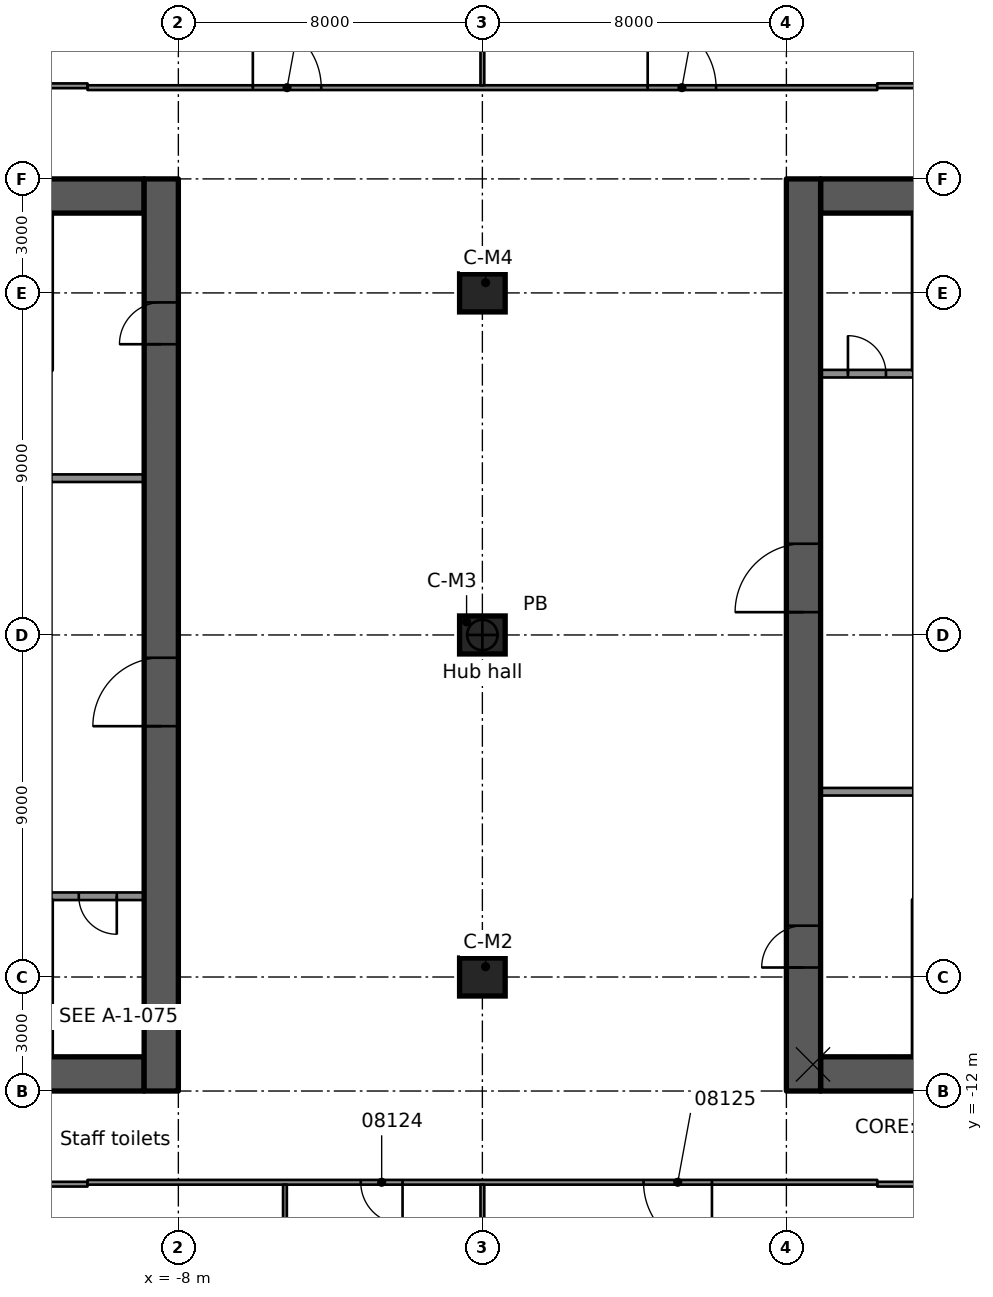
"""IFC4 building model, lengths in metres.
Left out: names, types, materials, properties, quantities, classifications, styles, units other than length and angle.
Written with IfcOpenShell. Run it as: python <this file> out.ifc"""

import sys

from ifc_helpers import new_model, si_unit, direction, frame, frame_2d, origin, origin_2d, place, context, subcontext, project, spatial, rectangle, extrude, element, fill, save


model = new_model("IFC4")
c1 = context("Model", 3, precision=1e-05, world=origin(), true_north=direction((0.0, 1.0)))
c2 = subcontext(c1, "Body", "Model", "MODEL_VIEW")
j1 = project(units=[si_unit("LENGTHUNIT", "METRE"), si_unit("PLANEANGLEUNIT", "RADIAN")], contexts=[c1])
p1 = place(None, origin())
s1 = spatial("IfcSite", under=j1, at=p1, CompositionType="ELEMENT")
p2 = place(p1, origin())
s2 = spatial("IfcBuilding", under=s1, at=p2, CompositionType="ELEMENT")
p3 = place(p2, frame((0.0, 0.0, 37.3)))
s3 = spatial("IfcBuildingStorey", under=s2, at=p3, CompositionType="ELEMENT", Elevation=37.3)
p4 = place(p3, frame((-18.1, 11.55, 0.0), z_axis=(0.0, 0.0, 1.0), x_axis=(1.0, 0.0, 0.0)))
e1 = element("IfcWall", 1, at=p4, inside=s3, PredefinedType="SHEAR", context=c2, shape_type="SweptSolid", body=[
    extrude(rectangle(XDim=9.2, YDim=0.9, at=frame_2d((4.6, 0.0))), origin(), (0.0, 0.0, 1.0), 3.5),
])
p5 = place(p4, frame((5.1, 0.0, 0.0)))
e2 = element("IfcOpeningElement", 2, at=p5, cuts=e1, PredefinedType="OPENING", context=c2, shape_type="SweptSolid", body=[
    extrude(rectangle(XDim=1.1, YDim=2.1, at=frame_2d((0.55, 1.05))), frame((0.0, 0.46, 0.0), z_axis=(0.0, -1.0, 0.0), x_axis=(1.0, 0.0, 0.0)), (0.0, 0.0, 1.0), 0.92),
])
p6 = place(p3, frame((-18.1, -11.55, 0.0), z_axis=(0.0, 0.0, 1.0), x_axis=(1.0, 0.0, 0.0)))
e3 = element("IfcWall", 3, at=p6, inside=s3, PredefinedType="SHEAR", context=c2, shape_type="SweptSolid", body=[
    extrude(rectangle(XDim=9.2, YDim=0.9, at=frame_2d((4.6, 0.0))), origin(), (0.0, 0.0, 1.0), 3.5),
])
p7 = place(p6, frame((5.1, 0.0, 0.0)))
e4 = element("IfcOpeningElement", 4, at=p7, cuts=e3, PredefinedType="OPENING", context=c2, shape_type="SweptSolid", body=[
    extrude(rectangle(XDim=1.1, YDim=2.1, at=frame_2d((0.55, 1.05))), frame((0.0, 0.46, 0.0), z_axis=(0.0, -1.0, 0.0), x_axis=(1.0, 0.0, 0.0)), (0.0, 0.0, 1.0), 0.92),
])
p8 = place(p3, frame((-8.45, -12.0, 0.0), z_axis=(0.0, 0.0, 1.0), x_axis=(0.0, 1.0, 0.0)))
e5 = element("IfcWall", 5, at=p8, inside=s3, PredefinedType="SHEAR", context=c2, shape_type="SweptSolid", body=[
    extrude(rectangle(XDim=24.0, YDim=0.9, at=frame_2d((12.0, 0.0))), origin(), (0.0, 0.0, 1.0), 3.5),
])
p9 = place(p8, frame((9.6, 0.0, 0.0)))
e6 = element("IfcOpeningElement", 6, at=p9, cuts=e5, PredefinedType="OPENING", context=c2, shape_type="SweptSolid", body=[
    extrude(rectangle(XDim=1.8, YDim=2.1, at=frame_2d((0.9, 1.05))), frame((0.0, 0.46, 0.0), z_axis=(0.0, -1.0, 0.0), x_axis=(1.0, 0.0, 0.0)), (0.0, 0.0, 1.0), 0.92),
])
p10 = place(p8, frame((19.65, 0.0, 0.0)))
e7 = element("IfcOpeningElement", 7, at=p10, cuts=e5, PredefinedType="OPENING", context=c2, shape_type="SweptSolid", body=[
    extrude(rectangle(XDim=1.1, YDim=2.1, at=frame_2d((0.55, 1.05))), frame((0.0, 0.46, 0.0), z_axis=(0.0, -1.0, 0.0), x_axis=(1.0, 0.0, 0.0)), (0.0, 0.0, 1.0), 0.92),
])
p11 = place(p3, frame((8.9, 11.55, 0.0), z_axis=(0.0, 0.0, 1.0), x_axis=(1.0, 0.0, 0.0)))
e8 = element("IfcWall", 8, at=p11, inside=s3, PredefinedType="SHEAR", context=c2, shape_type="SweptSolid", body=[
    extrude(rectangle(XDim=9.2, YDim=0.9, at=frame_2d((4.6, 0.0))), origin(), (0.0, 0.0, 1.0), 3.5),
])
p12 = place(p11, frame((3.0, 0.0, 0.0)))
e9 = element("IfcOpeningElement", 9, at=p12, cuts=e8, PredefinedType="OPENING", context=c2, shape_type="SweptSolid", body=[
    extrude(rectangle(XDim=1.1, YDim=2.1, at=frame_2d((0.55, 1.05))), frame((0.0, 0.46, 0.0), z_axis=(0.0, -1.0, 0.0), x_axis=(1.0, 0.0, 0.0)), (0.0, 0.0, 1.0), 0.92),
])
p13 = place(p3, frame((8.9, -11.55, 0.0), z_axis=(0.0, 0.0, 1.0), x_axis=(1.0, 0.0, 0.0)))
e10 = element("IfcWall", 10, at=p13, inside=s3, PredefinedType="SHEAR", context=c2, shape_type="SweptSolid", body=[
    extrude(rectangle(XDim=9.2, YDim=0.9, at=frame_2d((4.6, 0.0))), origin(), (0.0, 0.0, 1.0), 3.5),
])
p14 = place(p13, frame((3.0, 0.0, 0.0)))
e11 = element("IfcOpeningElement", 11, at=p14, cuts=e10, PredefinedType="OPENING", context=c2, shape_type="SweptSolid", body=[
    extrude(rectangle(XDim=1.1, YDim=2.1, at=frame_2d((0.55, 1.05))), frame((0.0, 0.46, 0.0), z_axis=(0.0, -1.0, 0.0), x_axis=(1.0, 0.0, 0.0)), (0.0, 0.0, 1.0), 0.92),
])
p15 = place(p3, frame((8.45, -12.0, 0.0), z_axis=(0.0, 0.0, 1.0), x_axis=(0.0, 1.0, 0.0)))
e12 = element("IfcWall", 12, at=p15, inside=s3, PredefinedType="SHEAR", context=c2, shape_type="SweptSolid", body=[
    extrude(rectangle(XDim=24.0, YDim=0.9, at=frame_2d((12.0, 0.0))), origin(), (0.0, 0.0, 1.0), 3.5),
])
p16 = place(p15, frame((12.6, 0.0, 0.0)))
e13 = element("IfcOpeningElement", 13, at=p16, cuts=e12, PredefinedType="OPENING", context=c2, shape_type="SweptSolid", body=[
    extrude(rectangle(XDim=1.8, YDim=2.1, at=frame_2d((0.9, 1.05))), frame((0.0, 0.46, 0.0), z_axis=(0.0, -1.0, 0.0), x_axis=(1.0, 0.0, 0.0)), (0.0, 0.0, 1.0), 0.92),
])
p17 = place(p15, frame((3.25, 0.0, 0.0)))
e14 = element("IfcOpeningElement", 14, at=p17, cuts=e12, PredefinedType="OPENING", context=c2, shape_type="SweptSolid", body=[
    extrude(rectangle(XDim=1.1, YDim=2.1, at=frame_2d((0.55, 1.05))), frame((0.0, 0.46, 0.0), z_axis=(0.0, -1.0, 0.0), x_axis=(1.0, 0.0, 0.0)), (0.0, 0.0, 1.0), 0.92),
])
for number, where, z_axis, x_axis in (
    (15, (0.0, -9.0, 0.0), (0.0, 0.0, 1.0), (1.0, 0.0, 0.0)),
    (16, (0.0, 0.0, 0.0), (0.0, 0.0, 1.0), (1.0, 0.0, 0.0)),
    (17, (0.0, 9.0, 0.0), (0.0, 0.0, 1.0), (1.0, 0.0, 0.0)),
):
    element("IfcColumn", number, at=place(p3, frame(where, z_axis=z_axis, x_axis=x_axis)), inside=s3, PredefinedType="COLUMN", context=c2, shape_type="SweptSolid", body=[
        extrude(rectangle(XDim=1.2, YDim=1.0, at=origin_2d()), origin(), (0.0, 0.0, 1.0), 3.5),
    ])
p18 = place(p3, frame((-8.9, 4.125, 0.0), z_axis=(0.0, 0.0, 1.0), x_axis=(-1.0, 0.0, 0.0)))
e18 = element("IfcWall", 18, at=p18, inside=s3, PredefinedType="PARTITIONING", context=c2, shape_type="SweptSolid", body=[
    extrude(rectangle(XDim=2.44, YDim=0.2, at=frame_2d((1.22, 0.0))), origin(), (0.0, 0.0, 1.0), 3.08),
])
p19 = place(p3, frame((-8.9, -6.875, 0.0), z_axis=(0.0, 0.0, 1.0), x_axis=(-1.0, 0.0, 0.0)))
e19 = element("IfcWall", 19, at=p19, inside=s3, PredefinedType="PARTITIONING", context=c2, shape_type="SweptSolid", body=[
    extrude(rectangle(XDim=2.44, YDim=0.2, at=frame_2d((1.22, 0.0))), origin(), (0.0, 0.0, 1.0), 3.08),
])
p20 = place(p19, frame((0.72, 0.0, 0.0)))
e20 = element("IfcOpeningElement", 20, at=p20, cuts=e19, PredefinedType="OPENING", context=c2, shape_type="SweptSolid", body=[
    extrude(rectangle(XDim=1.0, YDim=2.1, at=frame_2d((0.5, 1.05))), frame((0.0, 0.11, 0.0), z_axis=(0.0, -1.0, 0.0), x_axis=(1.0, 0.0, 0.0)), (0.0, 0.0, 1.0), 0.22),
])
p21 = place(p3, frame((8.9, -4.125, 0.0), z_axis=(0.0, 0.0, 1.0), x_axis=(1.0, 0.0, 0.0)))
e21 = element("IfcWall", 21, at=p21, inside=s3, PredefinedType="PARTITIONING", context=c2, shape_type="SweptSolid", body=[
    extrude(rectangle(XDim=2.44, YDim=0.2, at=frame_2d((1.22, 0.0))), origin(), (0.0, 0.0, 1.0), 3.08),
])
p22 = place(p3, frame((8.9, 6.875, 0.0), z_axis=(0.0, 0.0, 1.0), x_axis=(1.0, 0.0, 0.0)))
e22 = element("IfcWall", 22, at=p22, inside=s3, PredefinedType="PARTITIONING", context=c2, shape_type="SweptSolid", body=[
    extrude(rectangle(XDim=2.44, YDim=0.2, at=frame_2d((1.22, 0.0))), origin(), (0.0, 0.0, 1.0), 3.08),
])
p23 = place(p22, frame((0.72, 0.0, 0.0)))
e23 = element("IfcOpeningElement", 23, at=p23, cuts=e22, PredefinedType="OPENING", context=c2, shape_type="SweptSolid", body=[
    extrude(rectangle(XDim=1.0, YDim=2.1, at=frame_2d((0.5, 1.05))), frame((0.0, 0.11, 0.0), z_axis=(0.0, -1.0, 0.0), x_axis=(1.0, 0.0, 0.0)), (0.0, 0.0, 1.0), 0.22),
])
p24 = place(p3, frame((-14.736, -14.451, 0.0), z_axis=(0.0, 0.0, 1.0), x_axis=(1.0, 0.0, 0.0)))
e24 = element("IfcWall", 24, at=p24, inside=s3, PredefinedType="PARTITIONING", context=c2, shape_type="SweptSolid", body=[
    extrude(rectangle(XDim=4.345, YDim=0.125, at=frame_2d((2.172, 0.0))), origin(), (0.0, 0.0, 1.0), 3.06),
])
p25 = place(p3, frame((10.391, -14.451, 0.0), z_axis=(0.0, 0.0, 1.0), x_axis=(1.0, 0.0, 0.0)))
e25 = element("IfcWall", 25, at=p25, inside=s3, PredefinedType="PARTITIONING", context=c2, shape_type="SweptSolid", body=[
    extrude(rectangle(XDim=6.458, YDim=0.125, at=frame_2d((3.229, 0.0))), origin(), (0.0, 0.0, 1.0), 3.06),
])
p26 = place(p3, frame((10.391, -14.401, 0.0), z_axis=(0.0, 0.0, 1.0), x_axis=(-1.0, 0.0, 0.0)))
e26 = element("IfcWall", 26, at=p26, inside=s3, PredefinedType="PARTITIONING", context=c2, shape_type="SweptSolid", body=[
    extrude(rectangle(XDim=20.781, YDim=0.125, at=frame_2d((10.391, 0.0))), origin(), (0.0, 0.0, 1.0), 3.06),
])
p27 = place(p26, frame((12.491, 0.0, 0.0)))
e27 = element("IfcOpeningElement", 27, at=p27, cuts=e26, PredefinedType="OPENING", context=c2, shape_type="SweptSolid", body=[
    extrude(rectangle(XDim=1.1, YDim=2.1, at=frame_2d((0.55, 1.05))), frame((0.0, 0.073, 0.0), z_axis=(0.0, -1.0, 0.0), x_axis=(1.0, 0.0, 0.0)), (0.0, 0.0, 1.0), 0.145),
])
p28 = place(p26, frame((4.35, 0.0, 0.0)))
e28 = element("IfcOpeningElement", 28, at=p28, cuts=e26, PredefinedType="OPENING", context=c2, shape_type="SweptSolid", body=[
    extrude(rectangle(XDim=1.8, YDim=2.1, at=frame_2d((0.9, 1.05))), frame((0.0, 0.073, 0.0), z_axis=(0.0, -1.0, 0.0), x_axis=(1.0, 0.0, 0.0)), (0.0, 0.0, 1.0), 0.145),
])
p29 = place(p3, frame((-10.39, 14.401, 0.0), z_axis=(0.0, 0.0, 1.0), x_axis=(1.0, 0.0, 0.0)))
e29 = element("IfcWall", 29, at=p29, inside=s3, PredefinedType="PARTITIONING", context=c2, shape_type="SweptSolid", body=[
    extrude(rectangle(XDim=20.781, YDim=0.125, at=frame_2d((10.391, 0.0))), origin(), (0.0, 0.0, 1.0), 3.06),
])
p30 = place(p29, frame((14.74, 0.0, 0.0)))
e30 = element("IfcOpeningElement", 30, at=p30, cuts=e29, PredefinedType="OPENING", context=c2, shape_type="SweptSolid", body=[
    extrude(rectangle(XDim=1.8, YDim=2.1, at=frame_2d((0.9, 1.05))), frame((0.0, 0.073, 0.0), z_axis=(0.0, -1.0, 0.0), x_axis=(1.0, 0.0, 0.0)), (0.0, 0.0, 1.0), 0.145),
])
p31 = place(p29, frame((4.35, 0.0, 0.0)))
e31 = element("IfcOpeningElement", 31, at=p31, cuts=e29, PredefinedType="OPENING", context=c2, shape_type="SweptSolid", body=[
    extrude(rectangle(XDim=1.8, YDim=2.1, at=frame_2d((0.9, 1.05))), frame((0.0, 0.073, 0.0), z_axis=(0.0, -1.0, 0.0), x_axis=(1.0, 0.0, 0.0)), (0.0, 0.0, 1.0), 0.145),
])
p32 = place(p3, frame((-24.731, 14.45, 0.0), z_axis=(0.0, 0.0, 1.0), x_axis=(1.0, 0.0, 0.0)))
e32 = element("IfcWall", 32, at=p32, inside=s3, PredefinedType="PARTITIONING", context=c2, shape_type="SweptSolid", body=[
    extrude(rectangle(XDim=14.34, YDim=0.125, at=frame_2d((7.17, 0.0))), origin(), (0.0, 0.0, 1.0), 3.06),
])
p33 = place(p32, frame((6.131, 0.0, 0.0)))
e33 = element("IfcOpeningElement", 33, at=p33, cuts=e32, PredefinedType="OPENING", context=c2, shape_type="SweptSolid", body=[
    extrude(rectangle(XDim=1.8, YDim=2.1, at=frame_2d((0.9, 1.05))), frame((0.0, 0.073, 0.0), z_axis=(0.0, -1.0, 0.0), x_axis=(1.0, 0.0, 0.0)), (0.0, 0.0, 1.0), 0.145),
])
p34 = place(p3, frame((10.391, 14.451, 0.0), z_axis=(0.0, 0.0, 1.0), x_axis=(1.0, 0.0, 0.0)))
e34 = element("IfcWall", 34, at=p34, inside=s3, PredefinedType="PARTITIONING", context=c2, shape_type="SweptSolid", body=[
    extrude(rectangle(XDim=10.996, YDim=0.125, at=frame_2d((5.498, 0.0))), origin(), (0.0, 0.0, 1.0), 3.06),
])
for number, where, z_axis, x_axis in (
    (35, (0.0, -30.398, 0.0), (0.0, 0.0, 1.0), (0.0, 1.0, 0.0)),
    (36, (0.0, 14.463, 0.0), (0.0, 0.0, 1.0), (0.0, 1.0, 0.0)),
):
    element("IfcWall", number, at=place(p3, frame(where, z_axis=z_axis, x_axis=x_axis)), inside=s3, PredefinedType="PARTITIONING", context=c2, shape_type="SweptSolid", body=[
        extrude(rectangle(XDim=15.935, YDim=0.1, at=frame_2d((7.968, 0.0))), origin(), (0.0, 0.0, 1.0), 3.06),
    ])
p35 = place(p3, frame((-5.195, -32.637, 0.0), z_axis=(0.0, 0.0, 1.0), x_axis=(0.0, 1.0, 0.0)))
e37 = element("IfcWall", 37, at=p35, inside=s3, PredefinedType="PARTITIONING", context=c2, shape_type="SweptSolid", body=[
    extrude(rectangle(XDim=18.174, YDim=0.1, at=frame_2d((9.087, 0.0))), origin(), (0.0, 0.0, 1.0), 3.06),
])
p36 = place(p9, origin())
e38 = element("IfcDoor", 38, at=p36, inside=s3, OperationType="SINGLE_SWING_LEFT", PredefinedType="DOOR", context=c2, shape_type="SweptSolid", body=[
    extrude(rectangle(XDim=1.8, YDim=2.1, at=frame_2d((0.9, 1.05))), frame((0.0, 0.025, 0.0), z_axis=(0.0, -1.0, 0.0), x_axis=(1.0, 0.0, 0.0)), (0.0, 0.0, 1.0), 0.05),
])
fill(e6, e38)
p37 = place(p10, origin())
e39 = element("IfcDoor", 39, at=p37, inside=s3, OperationType="SINGLE_SWING_RIGHT", PredefinedType="DOOR", context=c2, shape_type="SweptSolid", body=[
    extrude(rectangle(XDim=1.1, YDim=2.1, at=frame_2d((0.55, 1.05))), frame((0.0, 0.025, 0.0), z_axis=(0.0, -1.0, 0.0), x_axis=(1.0, 0.0, 0.0)), (0.0, 0.0, 1.0), 0.05),
])
fill(e7, e39)
p38 = place(p20, origin())
e40 = element("IfcDoor", 40, at=p38, inside=s3, OperationType="SINGLE_SWING_RIGHT", PredefinedType="DOOR", context=c2, shape_type="SweptSolid", body=[
    extrude(rectangle(XDim=1.0, YDim=2.1, at=frame_2d((0.5, 1.05))), frame((0.0, 0.025, 0.0), z_axis=(0.0, -1.0, 0.0), x_axis=(1.0, 0.0, 0.0)), (0.0, 0.0, 1.0), 0.05),
])
fill(e20, e40)
p39 = place(p16, origin())
e41 = element("IfcDoor", 41, at=p39, inside=s3, OperationType="SINGLE_SWING_RIGHT", PredefinedType="DOOR", context=c2, shape_type="SweptSolid", body=[
    extrude(rectangle(XDim=1.8, YDim=2.1, at=frame_2d((0.9, 1.05))), frame((0.0, 0.025, 0.0), z_axis=(0.0, -1.0, 0.0), x_axis=(1.0, 0.0, 0.0)), (0.0, 0.0, 1.0), 0.05),
])
fill(e13, e41)
p40 = place(p17, origin())
e42 = element("IfcDoor", 42, at=p40, inside=s3, OperationType="SINGLE_SWING_LEFT", PredefinedType="DOOR", context=c2, shape_type="SweptSolid", body=[
    extrude(rectangle(XDim=1.1, YDim=2.1, at=frame_2d((0.55, 1.05))), frame((0.0, 0.025, 0.0), z_axis=(0.0, -1.0, 0.0), x_axis=(1.0, 0.0, 0.0)), (0.0, 0.0, 1.0), 0.05),
])
fill(e14, e42)
p41 = place(p23, origin())
e43 = element("IfcDoor", 43, at=p41, inside=s3, OperationType="SINGLE_SWING_RIGHT", PredefinedType="DOOR", context=c2, shape_type="SweptSolid", body=[
    extrude(rectangle(XDim=1.0, YDim=2.1, at=frame_2d((0.5, 1.05))), frame((0.0, 0.025, 0.0), z_axis=(0.0, -1.0, 0.0), x_axis=(1.0, 0.0, 0.0)), (0.0, 0.0, 1.0), 0.05),
])
fill(e23, e43)
p42 = place(p27, origin())
e44 = element("IfcDoor", 44, at=p42, inside=s3, OperationType="SINGLE_SWING_RIGHT", PredefinedType="DOOR", context=c2, shape_type="SweptSolid", body=[
    extrude(rectangle(XDim=1.1, YDim=2.1, at=frame_2d((0.55, 1.05))), frame((0.0, 0.025, 0.0), z_axis=(0.0, -1.0, 0.0), x_axis=(1.0, 0.0, 0.0)), (0.0, 0.0, 1.0), 0.05),
])
fill(e27, e44)
p43 = place(p28, origin())
e45 = element("IfcDoor", 45, at=p43, inside=s3, OperationType="DOUBLE_DOOR_SINGLE_SWING", PredefinedType="DOOR", context=c2, shape_type="SweptSolid", body=[
    extrude(rectangle(XDim=1.8, YDim=2.1, at=frame_2d((0.9, 1.05))), frame((0.0, 0.025, 0.0), z_axis=(0.0, -1.0, 0.0), x_axis=(1.0, 0.0, 0.0)), (0.0, 0.0, 1.0), 0.05),
])
fill(e28, e45)
p44 = place(p30, origin())
e46 = element("IfcDoor", 46, at=p44, inside=s3, OperationType="DOUBLE_DOOR_SINGLE_SWING", PredefinedType="DOOR", context=c2, shape_type="SweptSolid", body=[
    extrude(rectangle(XDim=1.8, YDim=2.1, at=frame_2d((0.9, 1.05))), frame((0.0, 0.025, 0.0), z_axis=(0.0, -1.0, 0.0), x_axis=(1.0, 0.0, 0.0)), (0.0, 0.0, 1.0), 0.05),
])
fill(e30, e46)
p45 = place(p31, origin())
e47 = element("IfcDoor", 47, at=p45, inside=s3, OperationType="DOUBLE_DOOR_SINGLE_SWING", PredefinedType="DOOR", context=c2, shape_type="SweptSolid", body=[
    extrude(rectangle(XDim=1.8, YDim=2.1, at=frame_2d((0.9, 1.05))), frame((0.0, 0.025, 0.0), z_axis=(0.0, -1.0, 0.0), x_axis=(1.0, 0.0, 0.0)), (0.0, 0.0, 1.0), 0.05),
])
fill(e31, e47)
save(model, sys.argv[1])
